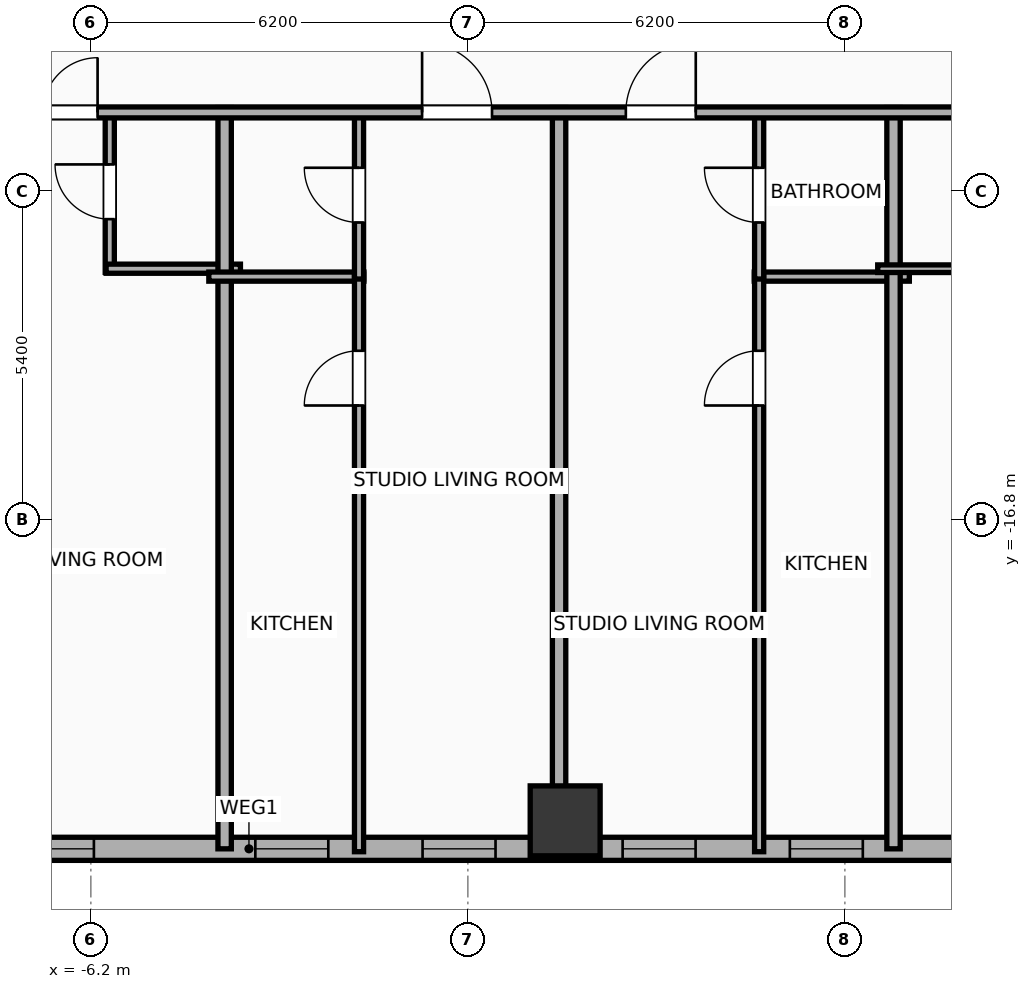
"""IFC4 building model, lengths in metres.
Left out: names, types, materials, properties, quantities, classifications, styles, units other than length and angle.
Written with IfcOpenShell. Run it as: python <this file> out.ifc"""

import sys

from ifc_helpers import new_model, si_unit, direction, frame, frame_2d, origin, origin_2d, place, context, subcontext, project, spatial, rectangle, hollow_rectangle, extrude, element, fill, save


model = new_model("IFC4")
c1 = context("Model", 3, precision=1e-05, world=origin(), true_north=direction((0.0, 1.0)))
c2 = subcontext(c1, "Body", "Model", "MODEL_VIEW")
j1 = project(units=[si_unit("LENGTHUNIT", "METRE"), si_unit("PLANEANGLEUNIT", "RADIAN")], contexts=[c1])
p1 = place(None, origin())
s1 = spatial("IfcSite", under=j1, at=p1, CompositionType="ELEMENT")
p2 = place(p1, origin())
s2 = spatial("IfcBuilding", under=s1, at=p2, CompositionType="ELEMENT")
p3 = place(p2, frame((0.0, 0.0, 33.8)))
s3 = spatial("IfcBuildingStorey", under=s2, at=p3, CompositionType="ELEMENT", Elevation=33.8)
p4 = place(p3, frame((1.6, -21.75, 0.0), z_axis=(0.0, 0.0, 1.0), x_axis=(1.0, 0.0, 0.0)))
e1 = element("IfcColumn", 1, at=p4, inside=s3, PredefinedType="COLUMN", context=c2, shape_type="SweptSolid", body=[
    extrude(hollow_rectangle(XDim=1.15, YDim=1.15, WallThickness=0.04, at=origin_2d()), origin(), (0.0, 0.0, 1.0), 3.9),
])
p5 = place(p3, frame((22.381, -22.21, 0.0), z_axis=(0.0, 0.0, 1.0), x_axis=(-1.0, 0.0, 0.0)))
e2 = element("IfcWall", 2, at=p5, inside=s3, PredefinedType="ELEMENTEDWALL", context=c2, shape_type="SweptSolid", body=[
    extrude(rectangle(XDim=51.963, YDim=0.38, at=frame_2d((25.981, 0.0))), origin(), (0.0, 0.0, 1.0), 3.65),
])
p6 = place(p5, frame((49.127, 0.0, 0.75)))
e3 = element("IfcOpeningElement", 3, at=p6, cuts=e2, PredefinedType="OPENING", context=c2, shape_type="SweptSolid", body=[
    extrude(rectangle(XDim=1.2, YDim=2.05, at=frame_2d((0.6, 1.025))), frame((0.0, 0.2, 0.0), z_axis=(0.0, -1.0, 0.0), x_axis=(1.0, 0.0, 0.0)), (0.0, 0.0, 1.0), 0.4),
])
p7 = place(p5, frame((43.926, 0.0, 0.75)))
e4 = element("IfcOpeningElement", 4, at=p7, cuts=e2, PredefinedType="OPENING", context=c2, shape_type="SweptSolid", body=[
    extrude(rectangle(XDim=1.2, YDim=2.05, at=frame_2d((0.6, 1.025))), frame((0.0, 0.2, 0.0), z_axis=(0.0, -1.0, 0.0), x_axis=(1.0, 0.0, 0.0)), (0.0, 0.0, 1.0), 0.4),
])
p8 = place(p5, frame((46.676, 0.0, 0.75)))
e5 = element("IfcOpeningElement", 5, at=p8, cuts=e2, PredefinedType="OPENING", context=c2, shape_type="SweptSolid", body=[
    extrude(rectangle(XDim=1.2, YDim=2.05, at=frame_2d((0.6, 1.025))), frame((0.0, 0.2, 0.0), z_axis=(0.0, -1.0, 0.0), x_axis=(1.0, 0.0, 0.0)), (0.0, 0.0, 1.0), 0.4),
])
p9 = place(p5, frame((39.531, 0.0, 0.75)))
e6 = element("IfcOpeningElement", 6, at=p9, cuts=e2, PredefinedType="OPENING", context=c2, shape_type="SweptSolid", body=[
    extrude(rectangle(XDim=1.2, YDim=2.05, at=frame_2d((0.6, 1.025))), frame((0.0, 0.2, 0.0), z_axis=(0.0, -1.0, 0.0), x_axis=(1.0, 0.0, 0.0)), (0.0, 0.0, 1.0), 0.4),
])
p10 = place(p5, frame((32.926, 0.0, 0.75)))
e7 = element("IfcOpeningElement", 7, at=p10, cuts=e2, PredefinedType="OPENING", context=c2, shape_type="SweptSolid", body=[
    extrude(rectangle(XDim=1.2, YDim=2.05, at=frame_2d((0.6, 1.025))), frame((0.0, 0.2, 0.0), z_axis=(0.0, -1.0, 0.0), x_axis=(1.0, 0.0, 0.0)), (0.0, 0.0, 1.0), 0.4),
])
p11 = place(p5, frame((35.676, 0.0, 0.75)))
e8 = element("IfcOpeningElement", 8, at=p11, cuts=e2, PredefinedType="OPENING", context=c2, shape_type="SweptSolid", body=[
    extrude(rectangle(XDim=1.2, YDim=2.05, at=frame_2d((0.6, 1.025))), frame((0.0, 0.2, 0.0), z_axis=(0.0, -1.0, 0.0), x_axis=(1.0, 0.0, 0.0)), (0.0, 0.0, 1.0), 0.4),
])
p12 = place(p5, frame((28.531, 0.0, 0.75)))
e9 = element("IfcOpeningElement", 9, at=p12, cuts=e2, PredefinedType="OPENING", context=c2, shape_type="SweptSolid", body=[
    extrude(rectangle(XDim=1.2, YDim=2.05, at=frame_2d((0.6, 1.025))), frame((0.0, 0.2, 0.0), z_axis=(0.0, -1.0, 0.0), x_axis=(1.0, 0.0, 0.0)), (0.0, 0.0, 1.0), 0.4),
])
p13 = place(p5, frame((21.926, 0.0, 0.75)))
e10 = element("IfcOpeningElement", 10, at=p13, cuts=e2, PredefinedType="OPENING", context=c2, shape_type="SweptSolid", body=[
    extrude(rectangle(XDim=1.2, YDim=2.05, at=frame_2d((0.6, 1.025))), frame((0.0, 0.2, 0.0), z_axis=(0.0, -1.0, 0.0), x_axis=(1.0, 0.0, 0.0)), (0.0, 0.0, 1.0), 0.4),
])
p14 = place(p5, frame((24.676, 0.0, 0.75)))
e11 = element("IfcOpeningElement", 11, at=p14, cuts=e2, PredefinedType="OPENING", context=c2, shape_type="SweptSolid", body=[
    extrude(rectangle(XDim=1.2, YDim=2.05, at=frame_2d((0.6, 1.025))), frame((0.0, 0.2, 0.0), z_axis=(0.0, -1.0, 0.0), x_axis=(1.0, 0.0, 0.0)), (0.0, 0.0, 1.0), 0.4),
])
p15 = place(p5, frame((18.636, 0.0, 0.75)))
e12 = element("IfcOpeningElement", 12, at=p15, cuts=e2, PredefinedType="OPENING", context=c2, shape_type="SweptSolid", body=[
    extrude(rectangle(XDim=1.2, YDim=2.05, at=frame_2d((0.6, 1.025))), frame((0.0, 0.2, 0.0), z_axis=(0.0, -1.0, 0.0), x_axis=(1.0, 0.0, 0.0)), (0.0, 0.0, 1.0), 0.4),
])
p16 = place(p5, frame((15.886, 0.0, 0.75)))
e13 = element("IfcOpeningElement", 13, at=p16, cuts=e2, PredefinedType="OPENING", context=c2, shape_type="SweptSolid", body=[
    extrude(rectangle(XDim=1.2, YDim=2.05, at=frame_2d((0.6, 1.025))), frame((0.0, 0.2, 0.0), z_axis=(0.0, -1.0, 0.0), x_axis=(1.0, 0.0, 0.0)), (0.0, 0.0, 1.0), 0.4),
])
p17 = place(p5, frame((12.031, 0.0, 0.75)))
e14 = element("IfcOpeningElement", 14, at=p17, cuts=e2, PredefinedType="OPENING", context=c2, shape_type="SweptSolid", body=[
    extrude(rectangle(XDim=1.2, YDim=2.05, at=frame_2d((0.6, 1.025))), frame((0.0, 0.2, 0.0), z_axis=(0.0, -1.0, 0.0), x_axis=(1.0, 0.0, 0.0)), (0.0, 0.0, 1.0), 0.4),
])
p18 = place(p5, frame((7.636, 0.0, 0.75)))
e15 = element("IfcOpeningElement", 15, at=p18, cuts=e2, PredefinedType="OPENING", context=c2, shape_type="SweptSolid", body=[
    extrude(rectangle(XDim=1.2, YDim=2.05, at=frame_2d((0.6, 1.025))), frame((0.0, 0.2, 0.0), z_axis=(0.0, -1.0, 0.0), x_axis=(1.0, 0.0, 0.0)), (0.0, 0.0, 1.0), 0.4),
])
p19 = place(p5, frame((4.886, 0.0, 0.75)))
e16 = element("IfcOpeningElement", 16, at=p19, cuts=e2, PredefinedType="OPENING", context=c2, shape_type="SweptSolid", body=[
    extrude(rectangle(XDim=1.2, YDim=2.05, at=frame_2d((0.6, 1.025))), frame((0.0, 0.2, 0.0), z_axis=(0.0, -1.0, 0.0), x_axis=(1.0, 0.0, 0.0)), (0.0, 0.0, 1.0), 0.4),
])
p20 = place(p5, frame((2.036, 0.0, 0.75)))
e17 = element("IfcOpeningElement", 17, at=p20, cuts=e2, PredefinedType="OPENING", context=c2, shape_type="SweptSolid", body=[
    extrude(rectangle(XDim=1.2, YDim=2.05, at=frame_2d((0.6, 1.025))), frame((0.0, 0.2, 0.0), z_axis=(0.0, -1.0, 0.0), x_axis=(1.0, 0.0, 0.0)), (0.0, 0.0, 1.0), 0.4),
])
p21 = place(p3, frame((-5.889, -12.73, 0.0), z_axis=(0.0, 0.0, 1.0), x_axis=(0.0, 1.0, 0.0)))
e18 = element("IfcWall", 18, at=p21, inside=s3, PredefinedType="PLUMBINGWALL", context=c2, shape_type="SweptSolid", body=[
    extrude(rectangle(XDim=2.65, YDim=0.15, at=frame_2d((1.325, 0.0))), origin(), (0.0, 0.0, 1.0), 3.65),
])
p22 = place(p21, frame((0.875, 0.0, 0.0)))
e19 = element("IfcOpeningElement", 19, at=p22, cuts=e18, PredefinedType="OPENING", context=c2, shape_type="SweptSolid", body=[
    extrude(rectangle(XDim=0.9, YDim=2.05, at=frame_2d((0.45, 1.025))), frame((0.0, 0.085, 0.0), z_axis=(0.0, -1.0, 0.0), x_axis=(1.0, 0.0, 0.0)), (0.0, 0.0, 1.0), 0.17),
])
p23 = place(p3, frame((-5.949, -12.67, 0.0), z_axis=(0.0, 0.0, 1.0), x_axis=(1.0, 0.0, 0.0)))
e20 = element("IfcWall", 20, at=p23, inside=s3, PredefinedType="PLUMBINGWALL", context=c2, shape_type="SweptSolid", body=[
    extrude(rectangle(XDim=2.209, YDim=0.15, at=frame_2d((1.104, 0.0))), origin(), (0.0, 0.0, 1.0), 3.65),
])
p24 = place(p3, frame((-4.0, -22.21, 0.0), z_axis=(0.0, 0.0, 1.0), x_axis=(0.0, 1.0, 0.0)))
e21 = element("IfcWall", 21, at=p24, inside=s3, PredefinedType="PARTITIONING", context=c2, shape_type="SweptSolid", body=[
    extrude(rectangle(XDim=12.19, YDim=0.22, at=frame_2d((6.095, 0.0))), origin(), (0.0, 0.0, 1.0), 3.65),
])
p25 = place(p3, frame((-4.26, -12.8, 0.0), z_axis=(0.0, 0.0, 1.0), x_axis=(1.0, 0.0, 0.0)))
e22 = element("IfcWall", 22, at=p25, inside=s3, PredefinedType="PLUMBINGWALL", context=c2, shape_type="SweptSolid", body=[
    extrude(rectangle(XDim=2.55, YDim=0.15, at=frame_2d((1.275, 0.0))), origin(), (0.0, 0.0, 1.0), 3.65),
])
p26 = place(p3, frame((-1.79, -22.258, 0.0), z_axis=(0.0, 0.0, 1.0), x_axis=(0.0, 1.0, 0.0)))
e23 = element("IfcWall", 23, at=p26, inside=s3, PredefinedType="PLUMBINGWALL", context=c2, shape_type="SweptSolid", body=[
    extrude(rectangle(XDim=9.498, YDim=0.15, at=frame_2d((4.749, 0.0))), origin(), (0.0, 0.0, 1.0), 3.65),
])
p27 = place(p26, frame((7.338, 0.0, 0.0)))
e24 = element("IfcOpeningElement", 24, at=p27, cuts=e23, PredefinedType="OPENING", context=c2, shape_type="SweptSolid", body=[
    extrude(rectangle(XDim=0.9, YDim=2.05, at=frame_2d((0.45, 1.025))), frame((0.0, 0.085, 0.0), z_axis=(0.0, -1.0, 0.0), x_axis=(1.0, 0.0, 0.0)), (0.0, 0.0, 1.0), 0.17),
])
p28 = place(p3, frame((-1.79, -12.84, 0.0), z_axis=(0.0, 0.0, 1.0), x_axis=(0.0, 1.0, 0.0)))
e25 = element("IfcWall", 25, at=p28, inside=s3, PredefinedType="PLUMBINGWALL", context=c2, shape_type="SweptSolid", body=[
    extrude(rectangle(XDim=2.76, YDim=0.15, at=frame_2d((1.38, 0.0))), origin(), (0.0, 0.0, 1.0), 3.65),
])
p29 = place(p28, frame((0.93, 0.0, 0.0)))
e26 = element("IfcOpeningElement", 26, at=p29, cuts=e25, PredefinedType="OPENING", context=c2, shape_type="SweptSolid", body=[
    extrude(rectangle(XDim=0.9, YDim=2.05, at=frame_2d((0.45, 1.025))), frame((0.0, 0.085, 0.0), z_axis=(0.0, -1.0, 0.0), x_axis=(1.0, 0.0, 0.0)), (0.0, 0.0, 1.0), 0.17),
])
p30 = place(p3, frame((1.5, -22.21, 0.0), z_axis=(0.0, 0.0, 1.0), x_axis=(0.0, 1.0, 0.0)))
e27 = element("IfcWall", 27, at=p30, inside=s3, PredefinedType="PARTITIONING", context=c2, shape_type="SweptSolid", body=[
    extrude(rectangle(XDim=12.19, YDim=0.22, at=frame_2d((6.095, 0.0))), origin(), (0.0, 0.0, 1.0), 2.94),
])
p31 = place(p3, frame((4.71, -12.8, 0.0), z_axis=(0.0, 0.0, 1.0), x_axis=(1.0, 0.0, 0.0)))
e28 = element("IfcWall", 28, at=p31, inside=s3, PredefinedType="PLUMBINGWALL", context=c2, shape_type="SweptSolid", body=[
    extrude(rectangle(XDim=2.55, YDim=0.15, at=frame_2d((1.275, 0.0))), origin(), (0.0, 0.0, 1.0), 3.65),
])
p32 = place(p3, frame((4.79, -22.258, 0.0), z_axis=(0.0, 0.0, 1.0), x_axis=(0.0, 1.0, 0.0)))
e29 = element("IfcWall", 29, at=p32, inside=s3, PredefinedType="PLUMBINGWALL", context=c2, shape_type="SweptSolid", body=[
    extrude(rectangle(XDim=9.498, YDim=0.15, at=frame_2d((4.749, 0.0))), origin(), (0.0, 0.0, 1.0), 3.65),
])
p33 = place(p32, frame((7.338, 0.0, 0.0)))
e30 = element("IfcOpeningElement", 30, at=p33, cuts=e29, PredefinedType="OPENING", context=c2, shape_type="SweptSolid", body=[
    extrude(rectangle(XDim=0.9, YDim=2.05, at=frame_2d((0.45, 1.025))), frame((0.0, 0.085, 0.0), z_axis=(0.0, -1.0, 0.0), x_axis=(1.0, 0.0, 0.0)), (0.0, 0.0, 1.0), 0.17),
])
p34 = place(p3, frame((4.79, -12.84, 0.0), z_axis=(0.0, 0.0, 1.0), x_axis=(0.0, 1.0, 0.0)))
e31 = element("IfcWall", 31, at=p34, inside=s3, PredefinedType="PLUMBINGWALL", context=c2, shape_type="SweptSolid", body=[
    extrude(rectangle(XDim=2.76, YDim=0.15, at=frame_2d((1.38, 0.0))), origin(), (0.0, 0.0, 1.0), 3.65),
])
p35 = place(p34, frame((0.93, 0.0, 0.0)))
e32 = element("IfcOpeningElement", 32, at=p35, cuts=e31, PredefinedType="OPENING", context=c2, shape_type="SweptSolid", body=[
    extrude(rectangle(XDim=0.9, YDim=2.05, at=frame_2d((0.45, 1.025))), frame((0.0, 0.085, 0.0), z_axis=(0.0, -1.0, 0.0), x_axis=(1.0, 0.0, 0.0)), (0.0, 0.0, 1.0), 0.17),
])
p36 = place(p3, frame((7.0, -22.21, 0.0), z_axis=(0.0, 0.0, 1.0), x_axis=(0.0, 1.0, 0.0)))
e33 = element("IfcWall", 33, at=p36, inside=s3, PredefinedType="PARTITIONING", context=c2, shape_type="SweptSolid", body=[
    extrude(rectangle(XDim=12.19, YDim=0.22, at=frame_2d((6.095, 0.0))), origin(), (0.0, 0.0, 1.0), 3.65),
])
p37 = place(p3, frame((6.74, -12.67, 0.0), z_axis=(0.0, 0.0, 1.0), x_axis=(1.0, 0.0, 0.0)))
e34 = element("IfcWall", 34, at=p37, inside=s3, PredefinedType="PARTITIONING", context=c2, shape_type="SweptSolid", body=[
    extrude(rectangle(XDim=2.63, YDim=0.125, at=frame_2d((1.315, 0.0))), origin(), (0.0, 0.0, 1.0), 3.65),
])
p38 = place(p3, frame((-33.41, -10.1, 0.0), z_axis=(0.0, 0.0, 1.0), x_axis=(1.0, 0.0, 0.0)))
e35 = element("IfcWall", 35, at=p38, inside=s3, PredefinedType="PARTITIONING", context=c2, shape_type="SweptSolid", body=[
    extrude(rectangle(XDim=59.62, YDim=0.18, at=frame_2d((29.81, 0.0))), origin(), (0.0, 0.0, 1.0), 3.65),
])
p39 = place(p38, frame((3.259, 0.0, 0.0)))
e36 = element("IfcOpeningElement", 36, at=p39, cuts=e35, PredefinedType="OPENING", context=c2, shape_type="SweptSolid", body=[
    extrude(rectangle(XDim=1.15, YDim=2.05, at=frame_2d((0.575, 1.025))), frame((0.0, 0.1, 0.0), z_axis=(0.0, -1.0, 0.0), x_axis=(1.0, 0.0, 0.0)), (0.0, 0.0, 1.0), 0.2),
])
p40 = place(p38, frame((10.657, 0.0, 0.0)))
e37 = element("IfcOpeningElement", 37, at=p40, cuts=e35, PredefinedType="OPENING", context=c2, shape_type="SweptSolid", body=[
    extrude(rectangle(XDim=1.15, YDim=2.05, at=frame_2d((0.575, 1.025))), frame((0.0, 0.1, 0.0), z_axis=(0.0, -1.0, 0.0), x_axis=(1.0, 0.0, 0.0)), (0.0, 0.0, 1.0), 0.2),
])
p41 = place(p38, frame((15.421, 0.0, 0.0)))
e38 = element("IfcOpeningElement", 38, at=p41, cuts=e35, PredefinedType="OPENING", context=c2, shape_type="SweptSolid", body=[
    extrude(rectangle(XDim=0.9, YDim=2.05, at=frame_2d((0.45, 1.025))), frame((0.0, 0.1, 0.0), z_axis=(0.0, -1.0, 0.0), x_axis=(1.0, 0.0, 0.0)), (0.0, 0.0, 1.0), 0.2),
])
p42 = place(p38, frame((21.657, 0.0, 0.0)))
e39 = element("IfcOpeningElement", 39, at=p42, cuts=e35, PredefinedType="OPENING", context=c2, shape_type="SweptSolid", body=[
    extrude(rectangle(XDim=1.15, YDim=2.05, at=frame_2d((0.575, 1.025))), frame((0.0, 0.1, 0.0), z_axis=(0.0, -1.0, 0.0), x_axis=(1.0, 0.0, 0.0)), (0.0, 0.0, 1.0), 0.2),
])
p43 = place(p38, frame((26.421, 0.0, 0.0)))
e40 = element("IfcOpeningElement", 40, at=p43, cuts=e35, PredefinedType="OPENING", context=c2, shape_type="SweptSolid", body=[
    extrude(rectangle(XDim=0.9, YDim=2.05, at=frame_2d((0.45, 1.025))), frame((0.0, 0.1, 0.0), z_axis=(0.0, -1.0, 0.0), x_axis=(1.0, 0.0, 0.0)), (0.0, 0.0, 1.0), 0.2),
])
p44 = place(p38, frame((32.657, 0.0, 0.0)))
e41 = element("IfcOpeningElement", 41, at=p44, cuts=e35, PredefinedType="OPENING", context=c2, shape_type="SweptSolid", body=[
    extrude(rectangle(XDim=1.15, YDim=2.05, at=frame_2d((0.575, 1.025))), frame((0.0, 0.1, 0.0), z_axis=(0.0, -1.0, 0.0), x_axis=(1.0, 0.0, 0.0)), (0.0, 0.0, 1.0), 0.2),
])
p45 = place(p38, frame((36.008, 0.0, 0.0)))
e42 = element("IfcOpeningElement", 42, at=p45, cuts=e35, PredefinedType="OPENING", context=c2, shape_type="SweptSolid", body=[
    extrude(rectangle(XDim=1.15, YDim=2.05, at=frame_2d((0.575, 1.025))), frame((0.0, 0.1, 0.0), z_axis=(0.0, -1.0, 0.0), x_axis=(1.0, 0.0, 0.0)), (0.0, 0.0, 1.0), 0.2),
])
p46 = place(p38, frame((42.917, 0.0, 0.0)))
e43 = element("IfcOpeningElement", 43, at=p46, cuts=e35, PredefinedType="OPENING", context=c2, shape_type="SweptSolid", body=[
    extrude(rectangle(XDim=0.9, YDim=2.05, at=frame_2d((0.45, 1.025))), frame((0.0, 0.1, 0.0), z_axis=(0.0, -1.0, 0.0), x_axis=(1.0, 0.0, 0.0)), (0.0, 0.0, 1.0), 0.2),
])
p47 = place(p38, frame((47.008, 0.0, 0.0)))
e44 = element("IfcOpeningElement", 44, at=p47, cuts=e35, PredefinedType="OPENING", context=c2, shape_type="SweptSolid", body=[
    extrude(rectangle(XDim=1.15, YDim=2.05, at=frame_2d((0.575, 1.025))), frame((0.0, 0.1, 0.0), z_axis=(0.0, -1.0, 0.0), x_axis=(1.0, 0.0, 0.0)), (0.0, 0.0, 1.0), 0.2),
])
p48 = place(p38, frame((55.14, 0.0, 0.0)))
e45 = element("IfcOpeningElement", 45, at=p48, cuts=e35, PredefinedType="OPENING", context=c2, shape_type="SweptSolid", body=[
    extrude(rectangle(XDim=1.15, YDim=2.05, at=frame_2d((0.575, 1.025))), frame((0.0, 0.1, 0.0), z_axis=(0.0, -1.0, 0.0), x_axis=(1.0, 0.0, 0.0)), (0.0, 0.0, 1.0), 0.2),
])
p49 = place(p12, origin())
e46 = element("IfcWindow", 46, at=p49, inside=s3, PartitioningType="SINGLE_PANEL", PredefinedType="WINDOW", context=c2, shape_type="SweptSolid", body=[
    extrude(rectangle(XDim=1.2, YDim=2.05, at=frame_2d((0.6, 1.025))), frame((0.0, 0.03, 0.0), z_axis=(0.0, -1.0, 0.0), x_axis=(1.0, 0.0, 0.0)), (0.0, 0.0, 1.0), 0.06),
])
fill(e9, e46)
p50 = place(p13, origin())
e47 = element("IfcWindow", 47, at=p50, inside=s3, PartitioningType="SINGLE_PANEL", PredefinedType="WINDOW", context=c2, shape_type="SweptSolid", body=[
    extrude(rectangle(XDim=1.2, YDim=2.05, at=frame_2d((0.6, 1.025))), frame((0.0, 0.03, 0.0), z_axis=(0.0, -1.0, 0.0), x_axis=(1.0, 0.0, 0.0)), (0.0, 0.0, 1.0), 0.06),
])
fill(e10, e47)
p51 = place(p14, origin())
e48 = element("IfcWindow", 48, at=p51, inside=s3, PartitioningType="SINGLE_PANEL", PredefinedType="WINDOW", context=c2, shape_type="SweptSolid", body=[
    extrude(rectangle(XDim=1.2, YDim=2.05, at=frame_2d((0.6, 1.025))), frame((0.0, 0.03, 0.0), z_axis=(0.0, -1.0, 0.0), x_axis=(1.0, 0.0, 0.0)), (0.0, 0.0, 1.0), 0.06),
])
fill(e11, e48)
p52 = place(p15, origin())
e49 = element("IfcWindow", 49, at=p52, inside=s3, PartitioningType="SINGLE_PANEL", PredefinedType="WINDOW", context=c2, shape_type="SweptSolid", body=[
    extrude(rectangle(XDim=1.2, YDim=2.05, at=frame_2d((0.6, 1.025))), frame((0.0, 0.03, 0.0), z_axis=(0.0, -1.0, 0.0), x_axis=(1.0, 0.0, 0.0)), (0.0, 0.0, 1.0), 0.06),
])
fill(e12, e49)
p53 = place(p16, origin())
e50 = element("IfcWindow", 50, at=p53, inside=s3, PartitioningType="SINGLE_PANEL", PredefinedType="WINDOW", context=c2, shape_type="SweptSolid", body=[
    extrude(rectangle(XDim=1.2, YDim=2.05, at=frame_2d((0.6, 1.025))), frame((0.0, 0.03, 0.0), z_axis=(0.0, -1.0, 0.0), x_axis=(1.0, 0.0, 0.0)), (0.0, 0.0, 1.0), 0.06),
])
fill(e13, e50)
p54 = place(p22, origin())
e51 = element("IfcDoor", 51, at=p54, inside=s3, OperationType="SINGLE_SWING_RIGHT", PredefinedType="DOOR", context=c2, shape_type="SweptSolid", body=[
    extrude(rectangle(XDim=0.9, YDim=2.05, at=frame_2d((0.45, 1.025))), frame((0.0, 0.025, 0.0), z_axis=(0.0, -1.0, 0.0), x_axis=(1.0, 0.0, 0.0)), (0.0, 0.0, 1.0), 0.05),
])
fill(e19, e51)
p55 = place(p27, origin())
e52 = element("IfcDoor", 52, at=p55, inside=s3, OperationType="SINGLE_SWING_LEFT", PredefinedType="DOOR", context=c2, shape_type="SweptSolid", body=[
    extrude(rectangle(XDim=0.9, YDim=2.05, at=frame_2d((0.45, 1.025))), frame((0.0, 0.025, 0.0), z_axis=(0.0, -1.0, 0.0), x_axis=(1.0, 0.0, 0.0)), (0.0, 0.0, 1.0), 0.05),
])
fill(e24, e52)
p56 = place(p29, origin())
e53 = element("IfcDoor", 53, at=p56, inside=s3, OperationType="SINGLE_SWING_RIGHT", PredefinedType="DOOR", context=c2, shape_type="SweptSolid", body=[
    extrude(rectangle(XDim=0.9, YDim=2.05, at=frame_2d((0.45, 1.025))), frame((0.0, 0.025, 0.0), z_axis=(0.0, -1.0, 0.0), x_axis=(1.0, 0.0, 0.0)), (0.0, 0.0, 1.0), 0.05),
])
fill(e26, e53)
p57 = place(p33, origin())
e54 = element("IfcDoor", 54, at=p57, inside=s3, OperationType="SINGLE_SWING_LEFT", PredefinedType="DOOR", context=c2, shape_type="SweptSolid", body=[
    extrude(rectangle(XDim=0.9, YDim=2.05, at=frame_2d((0.45, 1.025))), frame((0.0, 0.025, 0.0), z_axis=(0.0, -1.0, 0.0), x_axis=(1.0, 0.0, 0.0)), (0.0, 0.0, 1.0), 0.05),
])
fill(e30, e54)
p58 = place(p35, origin())
e55 = element("IfcDoor", 55, at=p58, inside=s3, OperationType="SINGLE_SWING_RIGHT", PredefinedType="DOOR", context=c2, shape_type="SweptSolid", body=[
    extrude(rectangle(XDim=0.9, YDim=2.05, at=frame_2d((0.45, 1.025))), frame((0.0, 0.025, 0.0), z_axis=(0.0, -1.0, 0.0), x_axis=(1.0, 0.0, 0.0)), (0.0, 0.0, 1.0), 0.05),
])
fill(e32, e55)
p59 = place(p43, origin())
e56 = element("IfcDoor", 56, at=p59, inside=s3, OperationType="SINGLE_SWING_RIGHT", PredefinedType="DOOR", context=c2, shape_type="SweptSolid", body=[
    extrude(rectangle(XDim=0.9, YDim=2.05, at=frame_2d((0.45, 1.025))), frame((0.0, 0.025, 0.0), z_axis=(0.0, -1.0, 0.0), x_axis=(1.0, 0.0, 0.0)), (0.0, 0.0, 1.0), 0.05),
])
fill(e40, e56)
p60 = place(p44, origin())
e57 = element("IfcDoor", 57, at=p60, inside=s3, OperationType="SINGLE_SWING_LEFT", PredefinedType="DOOR", context=c2, shape_type="SweptSolid", body=[
    extrude(rectangle(XDim=1.15, YDim=2.05, at=frame_2d((0.575, 1.025))), frame((0.0, 0.025, 0.0), z_axis=(0.0, -1.0, 0.0), x_axis=(1.0, 0.0, 0.0)), (0.0, 0.0, 1.0), 0.05),
])
fill(e41, e57)
p61 = place(p45, origin())
e58 = element("IfcDoor", 58, at=p61, inside=s3, OperationType="SINGLE_SWING_RIGHT", PredefinedType="DOOR", context=c2, shape_type="SweptSolid", body=[
    extrude(rectangle(XDim=1.15, YDim=2.05, at=frame_2d((0.575, 1.025))), frame((0.0, 0.025, 0.0), z_axis=(0.0, -1.0, 0.0), x_axis=(1.0, 0.0, 0.0)), (0.0, 0.0, 1.0), 0.05),
])
fill(e42, e58)
save(model, sys.argv[1])
